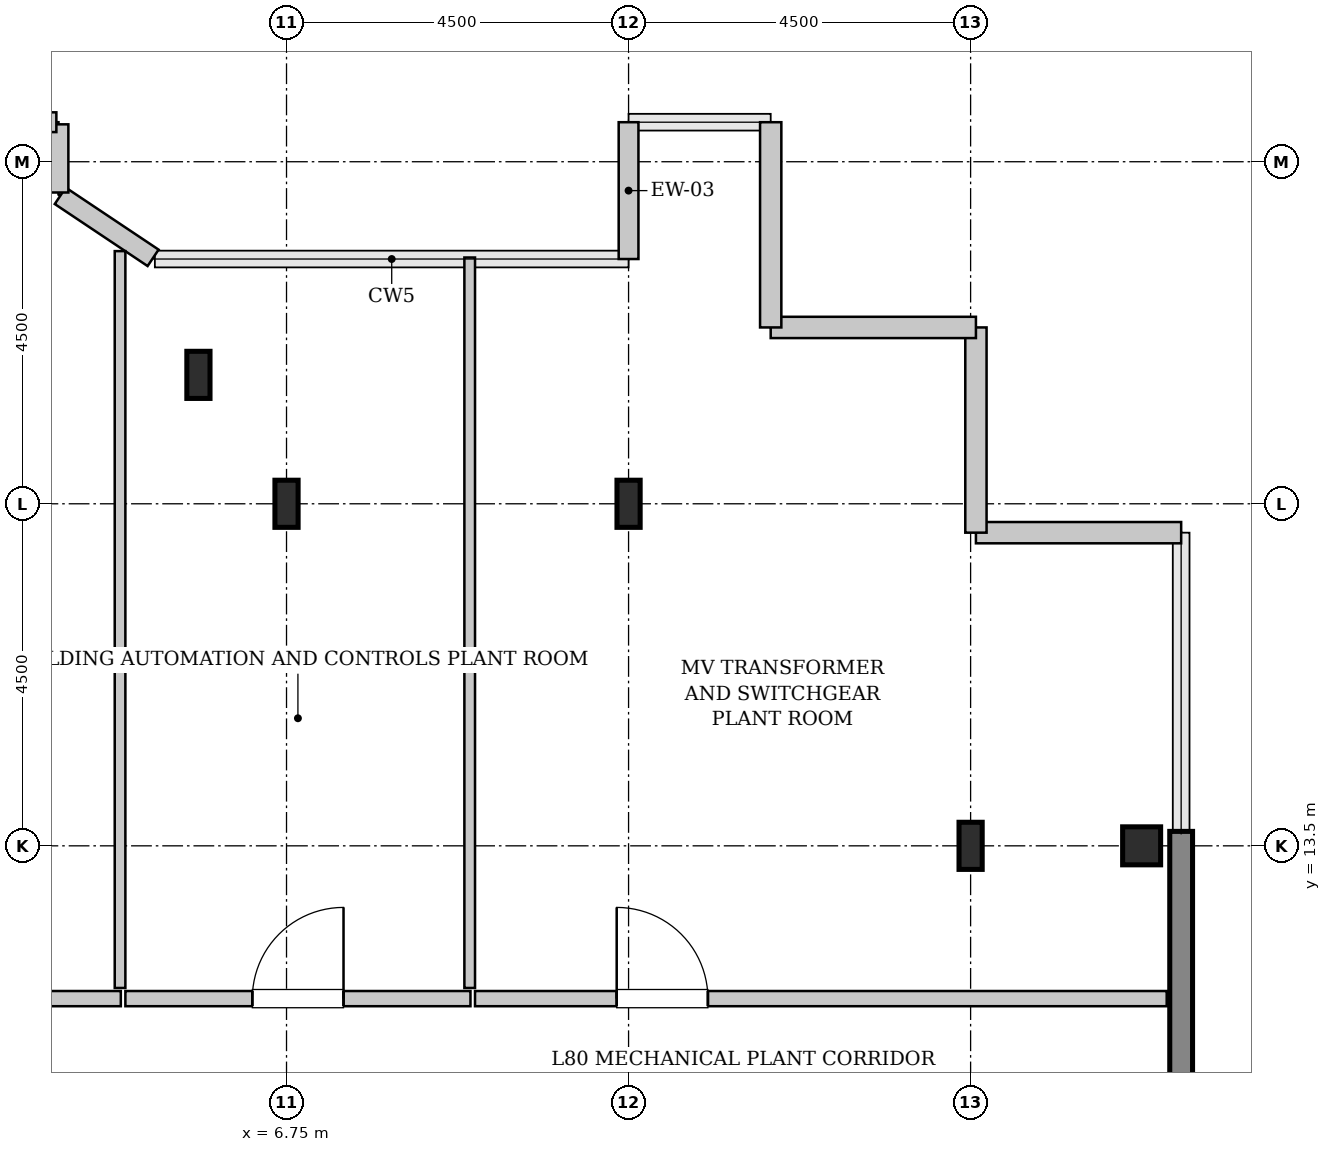
"""IFC4 building model, lengths in metres.
Left out: names, types, materials, properties, quantities, classifications, styles, units other than length and angle.
Written with IfcOpenShell. Run it as: python <this file> out.ifc"""

import sys

from ifc_helpers import new_model, si_unit, direction, frame, frame_2d, origin, origin_2d, place, context, subcontext, project, spatial, rectangle, hollow_rectangle, i_section, extrude, source, transform, mapped, element, fill, save


model = new_model("IFC4")
c1 = context("Model", 3, precision=1e-05, world=origin(), true_north=direction((0.0, 1.0)))
c2 = subcontext(c1, "Body", "Model", "MODEL_VIEW")
j1 = project(units=[si_unit("LENGTHUNIT", "METRE"), si_unit("PLANEANGLEUNIT", "RADIAN")], contexts=[c1])
p1 = place(None, origin())
s1 = spatial("IfcSite", under=j1, at=p1, CompositionType="ELEMENT")
p2 = place(p1, origin())
s2 = spatial("IfcBuilding", under=s1, at=p2, CompositionType="ELEMENT")
p3 = place(p2, frame((0.0, 0.0, 317.8)))
s3 = spatial("IfcBuildingStorey", under=s2, at=p3, CompositionType="ELEMENT", Elevation=317.8)
m1 = source(origin(), c2, "Body", "SweptSolid", [
    extrude(i_section(OverallWidth=0.305, OverallDepth=0.62, WebThickness=0.021, FlangeThickness=0.04, FilletRadius=0.027, at=origin_2d()), origin(), (0.0, 0.0, 1.0), 4.6),
])
for number, where, z_axis, x_axis in (
    (1, (5.591, 19.696, 0.0), (0.0, 0.0, 1.0), (1.0, 0.0, 0.0)),
    (2, (6.75, 18.0, 0.0), (0.0, 0.0, 1.0), (1.0, 0.0, 0.0)),
    (3, (11.25, 18.0, 0.0), (0.0, 0.0, 1.0), (1.0, 0.0, 0.0)),
    (4, (15.75, 13.5, 0.0), (0.0, 0.0, 1.0), (1.0, 0.0, 0.0)),
):
    element("IfcColumn", number, at=place(p3, frame(where, z_axis=z_axis, x_axis=x_axis)), inside=s3, PredefinedType="COLUMN", context=c2, shape_type="MappedRepresentation", body=[
        mapped(m1, transform((0.0, 0.0, 0.0), x_axis=(1.0, 0.0, 0.0), y_axis=(0.0, 1.0, 0.0), z_axis=(0.0, 0.0, 1.0), scale=1.0)),
    ])
m2 = source(origin(), c2, "Body", "SweptSolid", [
    extrude(hollow_rectangle(XDim=0.5, YDim=0.5, WallThickness=0.025, InnerFilletRadius=0.025, OuterFilletRadius=0.05, at=origin_2d()), origin(), (0.0, 0.0, 1.0), 4.6),
])
p4 = place(p3, frame((18.0, 13.5, 0.0), z_axis=(0.0, 0.0, 1.0), x_axis=(1.0, 0.0, 0.0)))
e5 = element("IfcColumn", 5, at=p4, inside=s3, PredefinedType="COLUMN", context=c2, shape_type="MappedRepresentation", body=[
    mapped(m2, transform((0.0, 0.0, 0.0), x_axis=(1.0, 0.0, 0.0), y_axis=(0.0, 1.0, 0.0), z_axis=(0.0, 0.0, 1.0), scale=1.0)),
])
m3 = source(origin(), c2, "Body", "SweptSolid", [
    extrude(rectangle(XDim=9.38, YDim=0.3, at=frame_2d((4.69, 0.0))), origin(), (0.0, 0.0, 1.0), 4.35),
])
p5 = place(p3, frame((18.52, 4.31, 0.0), z_axis=(0.0, 0.0, 1.0), x_axis=(0.0, 1.0, 0.0)))
e6 = element("IfcWall", 6, at=p5, inside=s3, PredefinedType="SHEAR", context=c2, shape_type="MappedRepresentation", body=[
    mapped(m3, transform((0.0, 0.0, 0.0), x_axis=(1.0, 0.0, 0.0), y_axis=(0.0, 1.0, 0.0), z_axis=(0.0, 0.0, 1.0), scale=1.0)),
])
m4 = source(origin(), c2, "Body", "SweptSolid", [
    extrude(rectangle(XDim=2.7, YDim=0.28, at=frame_2d((1.35, 0.0))), origin(), (0.0, 0.0, 1.0), 4.35),
])
for number, where, z_axis, x_axis in (
    (7, (18.52, 17.62, 0.0), (0.0, 0.0, 1.0), (-1.0, 0.0, 0.0)),
    (8, (15.82, 17.62, 0.0), (0.0, 0.0, 1.0), (0.0, 1.0, 0.0)),
    (9, (15.82, 20.32, 0.0), (0.0, 0.0, 1.0), (-1.0, 0.0, 0.0)),
    (10, (13.12, 20.32, 0.0), (0.0, 0.0, 1.0), (0.0, 1.0, 0.0)),
):
    element("IfcWall", number, at=place(p3, frame(where, z_axis=z_axis, x_axis=x_axis)), inside=s3, PredefinedType="SOLIDWALL", context=c2, shape_type="MappedRepresentation", body=[
        mapped(m4, transform((0.0, 0.0, 0.0), x_axis=(1.0, 0.0, 0.0), y_axis=(0.0, 1.0, 0.0), z_axis=(0.0, 0.0, 1.0), scale=1.0)),
    ])
m5 = source(origin(), c2, "Body", "SweptSolid", [
    extrude(rectangle(XDim=1.8, YDim=0.26, at=frame_2d((0.9, 0.0))), origin(), (0.0, 0.0, 1.0), 4.35),
])
p6 = place(p3, frame((11.25, 23.02, 0.0), z_axis=(0.0, 0.0, 1.0), x_axis=(0.0, -1.0, 0.0)))
e11 = element("IfcWall", 11, at=p6, inside=s3, PredefinedType="SOLIDWALL", context=c2, shape_type="MappedRepresentation", body=[
    mapped(m5, transform((0.0, 0.0, 0.0), x_axis=(1.0, 0.0, 0.0), y_axis=(0.0, 1.0, 0.0), z_axis=(0.0, 0.0, 1.0), scale=1.0)),
])
m6 = source(origin(), c2, "Body", "SweptSolid", [
    extrude(rectangle(XDim=1.469, YDim=0.26, at=frame_2d((0.734, 0.0))), origin(), (0.0, 0.0, 1.0), 4.35),
])
p7 = place(p3, frame((4.995, 21.236, 0.0), z_axis=(0.0, 0.0, 1.0), x_axis=(-0.831461760506, 0.555581983884, 0.0)))
e12 = element("IfcWall", 12, at=p7, inside=s3, PredefinedType="SOLIDWALL", context=c2, shape_type="MappedRepresentation", body=[
    mapped(m6, transform((0.0, 0.0, 0.0), x_axis=(1.0, 0.0, 0.0), y_axis=(0.0, 1.0, 0.0), z_axis=(0.0, 0.0, 1.0), scale=1.0)),
])
m7 = source(origin(), c2, "Body", "SweptSolid", [
    extrude(rectangle(XDim=0.897, YDim=0.26, at=frame_2d((0.448, 0.0))), origin(), (0.0, 0.0, 1.0), 4.35),
])
p8 = place(p3, frame((3.75, 22.095, 0.0), z_axis=(0.0, 0.0, 1.0), x_axis=(0.0, 1.0, 0.0)))
e13 = element("IfcWall", 13, at=p8, inside=s3, PredefinedType="SOLIDWALL", context=c2, shape_type="MappedRepresentation", body=[
    mapped(m7, transform((0.0, 0.0, 0.0), x_axis=(1.0, 0.0, 0.0), y_axis=(0.0, 1.0, 0.0), z_axis=(0.0, 0.0, 1.0), scale=1.0)),
])
m8 = source(origin(), c2, "Body", "SweptSolid", [
    extrude(rectangle(XDim=1.37, YDim=0.26, at=frame_2d((0.685, 0.0))), origin(), (0.0, 0.0, 1.0), 4.35),
])
p9 = place(p3, frame((3.722, 23.02, 0.0), z_axis=(0.0, 0.0, 1.0), x_axis=(-1.0, 0.0, 0.0)))
e14 = element("IfcWall", 14, at=p9, inside=s3, PredefinedType="SOLIDWALL", context=c2, shape_type="MappedRepresentation", body=[
    mapped(m8, transform((0.0, 0.0, 0.0), x_axis=(1.0, 0.0, 0.0), y_axis=(0.0, 1.0, 0.0), z_axis=(0.0, 0.0, 1.0), scale=1.0)),
])
m9 = source(origin(), c2, "Body", "SweptSolid", [
    extrude(rectangle(XDim=4.54, YDim=0.2, at=frame_2d((2.27, 0.0))), origin(), (0.0, 0.0, 1.0), 4.335),
])
p10 = place(p3, frame((0.03, 11.49, 0.0), z_axis=(0.0, 0.0, 1.0), x_axis=(1.0, 0.0, 0.0)))
e15 = element("IfcWall", 15, at=p10, inside=s3, PredefinedType="SOLIDWALL", context=c2, shape_type="MappedRepresentation", body=[
    mapped(m9, transform((0.0, 0.0, 0.0), x_axis=(1.0, 0.0, 0.0), y_axis=(0.0, 1.0, 0.0), z_axis=(0.0, 0.0, 1.0), scale=1.0)),
])
p11 = place(p10, frame((1.67, 0.0, 0.0)))
e16 = element("IfcOpeningElement", 16, at=p11, cuts=e15, PredefinedType="OPENING", context=c2, shape_type="SweptSolid", body=[
    extrude(rectangle(XDim=1.2, YDim=2.15, at=frame_2d((0.6, 1.075))), frame((0.0, 0.11, 0.0), z_axis=(0.0, -1.0, 0.0), x_axis=(1.0, 0.0, 0.0)), (0.0, 0.0, 1.0), 0.22),
])
m10 = source(origin(), c2, "Body", "SweptSolid", [
    extrude(rectangle(XDim=9.694, YDim=0.14, at=frame_2d((4.847, 0.0))), origin(), (0.0, 0.0, 1.0), 4.335),
])
p12 = place(p3, frame((4.56, 11.63, 0.0), z_axis=(0.0, 0.0, 1.0), x_axis=(0.0, 1.0, 0.0)))
e17 = element("IfcWall", 17, at=p12, inside=s3, PredefinedType="PARTITIONING", context=c2, shape_type="MappedRepresentation", body=[
    mapped(m10, transform((0.0, 0.0, 0.0), x_axis=(1.0, 0.0, 0.0), y_axis=(0.0, 1.0, 0.0), z_axis=(0.0, 0.0, 1.0), scale=1.0)),
])
p13 = place(p3, frame((4.63, 11.49, 0.0), z_axis=(0.0, 0.0, 1.0), x_axis=(1.0, 0.0, 0.0)))
e18 = element("IfcWall", 18, at=p13, inside=s3, PredefinedType="SOLIDWALL", context=c2, shape_type="MappedRepresentation", body=[
    mapped(m9, transform((0.0, 0.0, 0.0), x_axis=(1.0, 0.0, 0.0), y_axis=(0.0, 1.0, 0.0), z_axis=(0.0, 0.0, 1.0), scale=1.0)),
])
p14 = place(p13, frame((1.67, 0.0, 0.0)))
e19 = element("IfcOpeningElement", 19, at=p14, cuts=e18, PredefinedType="OPENING", context=c2, shape_type="SweptSolid", body=[
    extrude(rectangle(XDim=1.2, YDim=2.15, at=frame_2d((0.6, 1.075))), frame((0.0, 0.11, 0.0), z_axis=(0.0, -1.0, 0.0), x_axis=(1.0, 0.0, 0.0)), (0.0, 0.0, 1.0), 0.22),
])
m11 = source(origin(), c2, "Body", "SweptSolid", [
    extrude(rectangle(XDim=9.61, YDim=0.14, at=frame_2d((4.805, 0.0))), origin(), (0.0, 0.0, 1.0), 4.335),
])
p15 = place(p3, frame((9.16, 11.63, 0.0), z_axis=(0.0, 0.0, 1.0), x_axis=(0.0, 1.0, 0.0)))
e20 = element("IfcWall", 20, at=p15, inside=s3, PredefinedType="PARTITIONING", context=c2, shape_type="MappedRepresentation", body=[
    mapped(m11, transform((0.0, 0.0, 0.0), x_axis=(1.0, 0.0, 0.0), y_axis=(0.0, 1.0, 0.0), z_axis=(0.0, 0.0, 1.0), scale=1.0)),
])
m12 = source(origin(), c2, "Body", "SweptSolid", [
    extrude(rectangle(XDim=9.1, YDim=0.2, at=frame_2d((4.55, 0.0))), origin(), (0.0, 0.0, 1.0), 4.335),
])
p16 = place(p3, frame((9.23, 11.49, 0.0), z_axis=(0.0, 0.0, 1.0), x_axis=(1.0, 0.0, 0.0)))
e21 = element("IfcWall", 21, at=p16, inside=s3, PredefinedType="SOLIDWALL", context=c2, shape_type="MappedRepresentation", body=[
    mapped(m12, transform((0.0, 0.0, 0.0), x_axis=(1.0, 0.0, 0.0), y_axis=(0.0, 1.0, 0.0), z_axis=(0.0, 0.0, 1.0), scale=1.0)),
])
p17 = place(p16, frame((1.864, 0.0, 0.0)))
e22 = element("IfcOpeningElement", 22, at=p17, cuts=e21, PredefinedType="OPENING", context=c2, shape_type="SweptSolid", body=[
    extrude(rectangle(XDim=1.2, YDim=2.15, at=frame_2d((0.6, 1.075))), frame((0.0, 0.11, 0.0), z_axis=(0.0, -1.0, 0.0), x_axis=(1.0, 0.0, 0.0)), (0.0, 0.0, 1.0), 0.22),
])
m13 = source(origin(), c2, "Body", "SweptSolid", [
    extrude(rectangle(XDim=1.2, YDim=2.15, at=frame_2d((0.6, 1.075))), frame((0.0, 0.025, 0.0), z_axis=(0.0, -1.0, 0.0), x_axis=(1.0, 0.0, 0.0)), (0.0, 0.0, 1.0), 0.05),
])
p18 = place(p14, origin())
e23 = element("IfcDoor", 23, at=p18, inside=s3, OperationType="SINGLE_SWING_RIGHT", PredefinedType="DOOR", context=c2, shape_type="MappedRepresentation", body=[
    mapped(m13, transform((0.0, 0.0, 0.0), x_axis=(1.0, 0.0, 0.0), y_axis=(0.0, 1.0, 0.0), z_axis=(0.0, 0.0, 1.0), scale=1.0)),
])
fill(e19, e23)
p19 = place(p17, origin())
e24 = element("IfcDoor", 24, at=p19, inside=s3, OperationType="SINGLE_SWING_LEFT", PredefinedType="DOOR", context=c2, shape_type="MappedRepresentation", body=[
    mapped(m13, transform((0.0, 0.0, 0.0), x_axis=(1.0, 0.0, 0.0), y_axis=(0.0, 1.0, 0.0), z_axis=(0.0, 0.0, 1.0), scale=1.0)),
])
fill(e22, e24)
save(model, sys.argv[1])
